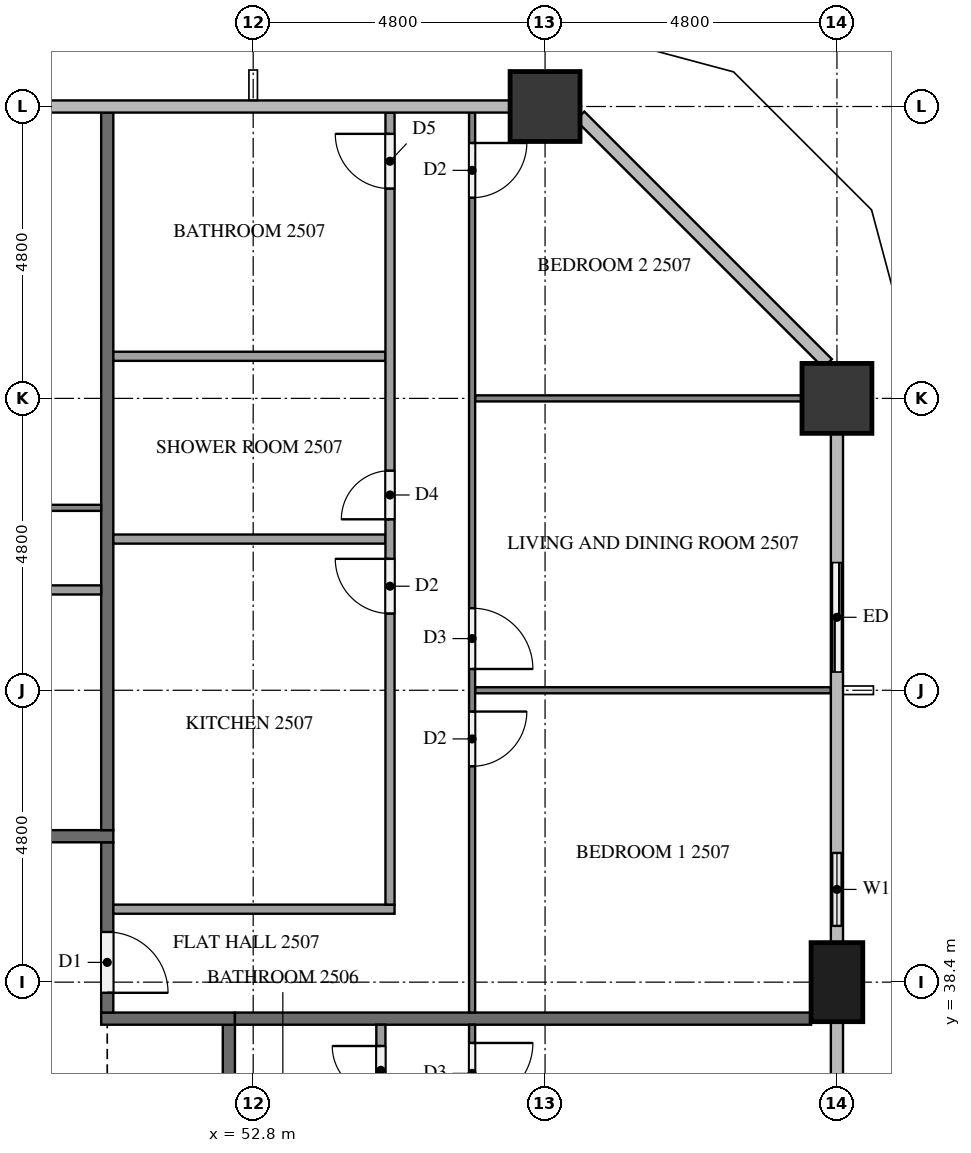
"""IFC4 building model, lengths in metres.
Left out: names, types, materials, properties, quantities, classifications, styles, units other than length and angle.
Written with IfcOpenShell. Run it as: python <this file> out.ifc"""

import sys

from ifc_helpers import new_model, si_unit, direction, frame, frame_2d, origin, origin_2d, place, context, subcontext, project, spatial, rectangle, extrude, element, fill, save


model = new_model("IFC4")
c1 = context("Model", 3, precision=1e-05, world=origin(), true_north=direction((0.0, 1.0)))
c2 = subcontext(c1, "Body", "Model", "MODEL_VIEW")
j1 = project(units=[si_unit("LENGTHUNIT", "METRE"), si_unit("PLANEANGLEUNIT", "RADIAN")], contexts=[c1])
p1 = place(None, origin())
s1 = spatial("IfcSite", under=j1, at=p1, CompositionType="ELEMENT")
p2 = place(p1, origin())
s2 = spatial("IfcBuilding", under=s1, at=p2, CompositionType="ELEMENT")
p3 = place(p2, frame((0.0, 0.0, 99.7)))
s3 = spatial("IfcBuildingStorey", under=s2, at=p3, CompositionType="ELEMENT", Elevation=99.7)
p4 = place(p3, frame((62.4, 38.4, 0.0), z_axis=(0.0, 0.0, 1.0), x_axis=(0.0, 1.0, 0.0)))
e1 = element("IfcColumn", 1, at=p4, inside=s3, PredefinedType="COLUMN", context=c2, shape_type="SweptSolid", body=[
    extrude(rectangle(XDim=1.3, YDim=0.85, at=origin_2d()), origin(), (0.0, 0.0, 1.0), 3.2),
])
for number, where, z_axis, x_axis in (
    (2, (62.4, 48.0, 0.0), (0.0, 0.0, 1.0), (1.0, 0.0, 0.0)),
    (3, (57.6, 52.8, 0.0), (0.0, 0.0, 1.0), (1.0, 0.0, 0.0)),
):
    element("IfcColumn", number, at=place(p3, frame(where, z_axis=z_axis, x_axis=x_axis)), inside=s3, PredefinedType="COLUMN", context=c2, shape_type="SweptSolid", body=[
        extrude(rectangle(XDim=1.15, YDim=1.15, at=origin_2d()), origin(), (0.0, 0.0, 1.0), 3.2),
    ])
p5 = place(p3, frame((62.4, 39.05, 0.0), z_axis=(0.0, 0.0, 1.0), x_axis=(0.0, 1.0, 0.0)))
e4 = element("IfcWall", 4, at=p5, inside=s3, PredefinedType="SOLIDWALL", context=c2, shape_type="SweptSolid", body=[
    extrude(rectangle(XDim=1.75, YDim=0.15, at=frame_2d((0.875, 0.0))), origin(), (0.0, 0.0, 1.0), 3.2),
])
p6 = place(p5, frame((0.275, 0.0, 0.9)))
e5 = element("IfcOpeningElement", 5, at=p6, cuts=e4, PredefinedType="OPENING", context=c2, shape_type="SweptSolid", body=[
    extrude(rectangle(XDim=1.2, YDim=1.4, at=frame_2d((0.6, 0.7))), frame((0.0, 0.085, 0.0), z_axis=(0.0, -1.0, 0.0), x_axis=(1.0, 0.0, 0.0)), (0.0, 0.0, 1.0), 0.17),
])
p7 = place(p3, frame((62.4, 43.2, 0.0), z_axis=(0.0, 0.0, 1.0), x_axis=(0.0, 1.0, 0.0)))
e6 = element("IfcWall", 6, at=p7, inside=s3, PredefinedType="SOLIDWALL", context=c2, shape_type="SweptSolid", body=[
    extrude(rectangle(XDim=2.4, YDim=0.15, at=frame_2d((1.2, 0.0))), origin(), (0.0, 0.0, 1.0), 3.2),
])
p8 = place(p7, frame((0.3, 0.0, 0.0)))
e7 = element("IfcOpeningElement", 7, at=p8, cuts=e6, PredefinedType="OPENING", context=c2, shape_type="SweptSolid", body=[
    extrude(rectangle(XDim=1.8, YDim=2.4, at=frame_2d((0.9, 1.2))), frame((0.0, 0.085, 0.0), z_axis=(0.0, -1.0, 0.0), x_axis=(1.0, 0.0, 0.0)), (0.0, 0.0, 1.0), 0.17),
])
p9 = place(p3, frame((52.4, 37.7, 0.0), z_axis=(0.0, 0.0, 1.0), x_axis=(0.0, -1.0, 0.0)))
e8 = element("IfcWall", 8, at=p9, inside=s3, PredefinedType="PARTITIONING", context=c2, shape_type="SweptSolid", body=[
    extrude(rectangle(XDim=22.6, YDim=0.2, at=frame_2d((11.3, 0.0))), origin(), (0.0, 0.0, 1.0), 3.2),
])
p10 = place(p9, frame((6.925, 0.0, 0.0)))
e9 = element("IfcOpeningElement", 9, at=p10, cuts=e8, PredefinedType="OPENING", context=c2, shape_type="SweptSolid", body=[
    extrude(rectangle(XDim=1.0, YDim=2.1, at=frame_2d((0.5, 1.05))), frame((0.0, 0.11, 0.0), z_axis=(0.0, -1.0, 0.0), x_axis=(1.0, 0.0, 0.0)), (0.0, 0.0, 1.0), 0.22),
])
p11 = place(p9, frame((5.075, 0.0, 0.0)))
e10 = element("IfcOpeningElement", 10, at=p11, cuts=e8, PredefinedType="OPENING", context=c2, shape_type="SweptSolid", body=[
    extrude(rectangle(XDim=1.0, YDim=2.1, at=frame_2d((0.5, 1.05))), frame((0.0, 0.11, 0.0), z_axis=(0.0, -1.0, 0.0), x_axis=(1.0, 0.0, 0.0)), (0.0, 0.0, 1.0), 0.22),
])
p12 = place(p3, frame((52.5, 37.8, 0.0), z_axis=(0.0, 0.0, 1.0), x_axis=(-1.0, 0.0, 0.0)))
e11 = element("IfcWall", 11, at=p12, inside=s3, PredefinedType="PARTITIONING", context=c2, shape_type="SweptSolid", body=[
    extrude(rectangle(XDim=2.2, YDim=0.2, at=frame_2d((1.1, 0.0))), origin(), (0.0, 0.0, 1.0), 3.2),
])
p13 = place(p3, frame((50.4, 40.7, 0.0), z_axis=(0.0, 0.0, 1.0), x_axis=(0.0, -1.0, 0.0)))
e12 = element("IfcWall", 12, at=p13, inside=s3, PredefinedType="PARTITIONING", context=c2, shape_type="SweptSolid", body=[
    extrude(rectangle(XDim=2.8, YDim=0.2, at=frame_2d((1.4, 0.0))), origin(), (0.0, 0.0, 1.0), 3.2),
])
p14 = place(p13, frame((1.475, 0.0, 0.0)))
e13 = element("IfcOpeningElement", 13, at=p14, cuts=e12, PredefinedType="OPENING", context=c2, shape_type="SweptSolid", body=[
    extrude(rectangle(XDim=1.0, YDim=2.1, at=frame_2d((0.5, 1.05))), frame((0.0, 0.11, 0.0), z_axis=(0.0, -1.0, 0.0), x_axis=(1.0, 0.0, 0.0)), (0.0, 0.0, 1.0), 0.22),
])
p15 = place(p3, frame((11.9, 40.8, 0.0), z_axis=(0.0, 0.0, 1.0), x_axis=(1.0, 0.0, 0.0)))
e14 = element("IfcWall", 14, at=p15, inside=s3, PredefinedType="PARTITIONING", context=c2, shape_type="SweptSolid", body=[
    extrude(rectangle(XDim=38.6, YDim=0.2, at=frame_2d((19.3, 0.0))), origin(), (0.0, 0.0, 1.0), 3.2),
])
p16 = place(p15, frame((22.125, 0.0, 0.0)))
e15 = element("IfcOpeningElement", 15, at=p16, cuts=e14, PredefinedType="OPENING", context=c2, shape_type="SweptSolid", body=[
    extrude(rectangle(XDim=1.0, YDim=2.1, at=frame_2d((0.5, 1.05))), frame((0.0, 0.11, 0.0), z_axis=(0.0, -1.0, 0.0), x_axis=(1.0, 0.0, 0.0)), (0.0, 0.0, 1.0), 0.22),
])
p17 = place(p15, frame((20.275, 0.0, 0.0)))
e16 = element("IfcOpeningElement", 16, at=p17, cuts=e14, PredefinedType="OPENING", context=c2, shape_type="SweptSolid", body=[
    extrude(rectangle(XDim=1.0, YDim=2.1, at=frame_2d((0.5, 1.05))), frame((0.0, 0.11, 0.0), z_axis=(0.0, -1.0, 0.0), x_axis=(1.0, 0.0, 0.0)), (0.0, 0.0, 1.0), 0.22),
])
p18 = place(p15, frame((0.525, 0.0, 0.0)))
e17 = element("IfcOpeningElement", 17, at=p18, cuts=e14, PredefinedType="OPENING", context=c2, shape_type="SweptSolid", body=[
    extrude(rectangle(XDim=1.0, YDim=2.1, at=frame_2d((0.5, 1.05))), frame((0.0, 0.11, 0.0), z_axis=(0.0, -1.0, 0.0), x_axis=(1.0, 0.0, 0.0)), (0.0, 0.0, 1.0), 0.22),
])
p19 = place(p3, frame((52.5, 37.8, 0.0), z_axis=(0.0, 0.0, 1.0), x_axis=(1.0, 0.0, 0.0)))
e18 = element("IfcWall", 18, at=p19, inside=s3, PredefinedType="PARTITIONING", context=c2, shape_type="SweptSolid", body=[
    extrude(rectangle(XDim=9.475, YDim=0.2, at=frame_2d((4.738, 0.0))), origin(), (0.0, 0.0, 1.0), 3.2),
])
p20 = place(p3, frame((50.4, 40.9, 0.0), z_axis=(0.0, 0.0, 1.0), x_axis=(0.0, 1.0, 0.0)))
e19 = element("IfcWall", 19, at=p20, inside=s3, PredefinedType="PARTITIONING", context=c2, shape_type="SweptSolid", body=[
    extrude(rectangle(XDim=11.8, YDim=0.2, at=frame_2d((5.9, 0.0))), origin(), (0.0, 0.0, 1.0), 3.2),
])
p21 = place(p3, frame((56.4, 37.7, 0.0), z_axis=(0.0, 0.0, 1.0), x_axis=(0.0, -1.0, 0.0)))
e20 = element("IfcWall", 20, at=p21, inside=s3, PredefinedType="PARTITIONING", context=c2, shape_type="SweptSolid", body=[
    extrude(rectangle(XDim=6.4, YDim=0.1, at=frame_2d((3.2, 0.0))), origin(), (0.0, 0.0, 1.0), 3.2),
])
p22 = place(p21, frame((0.3, 0.0, 0.0)))
e21 = element("IfcOpeningElement", 21, at=p22, cuts=e20, PredefinedType="OPENING", context=c2, shape_type="SweptSolid", body=[
    extrude(rectangle(XDim=1.0, YDim=2.1, at=frame_2d((0.5, 1.05))), frame((0.0, 0.06, 0.0), z_axis=(0.0, -1.0, 0.0), x_axis=(1.0, 0.0, 0.0)), (0.0, 0.0, 1.0), 0.12),
])
p23 = place(p3, frame((54.9, 33.075, 0.0), z_axis=(0.0, 0.0, 1.0), x_axis=(0.0, 1.0, 0.0)))
e22 = element("IfcWall", 22, at=p23, inside=s3, PredefinedType="PARTITIONING", context=c2, shape_type="SweptSolid", body=[
    extrude(rectangle(XDim=4.625, YDim=0.15, at=frame_2d((2.312, 0.0))), origin(), (0.0, 0.0, 1.0), 3.2),
])
p24 = place(p23, frame((0.3, 0.0, 0.0)))
e23 = element("IfcOpeningElement", 23, at=p24, cuts=e22, PredefinedType="OPENING", context=c2, shape_type="SweptSolid", body=[
    extrude(rectangle(XDim=0.9, YDim=2.1, at=frame_2d((0.45, 1.05))), frame((0.0, 0.085, 0.0), z_axis=(0.0, -1.0, 0.0), x_axis=(1.0, 0.0, 0.0)), (0.0, 0.0, 1.0), 0.17),
])
p25 = place(p23, frame((3.475, 0.0, 0.0)))
e24 = element("IfcOpeningElement", 24, at=p25, cuts=e22, PredefinedType="OPENING", context=c2, shape_type="SweptSolid", body=[
    extrude(rectangle(XDim=0.8, YDim=2.1, at=frame_2d((0.4, 1.05))), frame((0.0, 0.085, 0.0), z_axis=(0.0, -1.0, 0.0), x_axis=(1.0, 0.0, 0.0)), (0.0, 0.0, 1.0), 0.17),
])
p26 = place(p3, frame((56.45, 43.2, 0.0), z_axis=(0.0, 0.0, 1.0), x_axis=(1.0, 0.0, 0.0)))
e25 = element("IfcWall", 25, at=p26, inside=s3, PredefinedType="PARTITIONING", context=c2, shape_type="SweptSolid", body=[
    extrude(rectangle(XDim=5.85, YDim=0.1, at=frame_2d((2.925, 0.0))), origin(), (0.0, 0.0, 1.0), 3.2),
])
p27 = place(p3, frame((56.45, 48.0, 0.0), z_axis=(0.0, 0.0, 1.0), x_axis=(1.0, 0.0, 0.0)))
e26 = element("IfcWall", 26, at=p27, inside=s3, PredefinedType="PARTITIONING", context=c2, shape_type="SweptSolid", body=[
    extrude(rectangle(XDim=5.375, YDim=0.1, at=frame_2d((2.688, 0.0))), origin(), (0.0, 0.0, 1.0), 3.2),
])
p28 = place(p3, frame((56.4, 52.7, 0.0), z_axis=(0.0, 0.0, 1.0), x_axis=(0.0, -1.0, 0.0)))
e27 = element("IfcWall", 27, at=p28, inside=s3, PredefinedType="PARTITIONING", context=c2, shape_type="SweptSolid", body=[
    extrude(rectangle(XDim=14.8, YDim=0.1, at=frame_2d((7.4, 0.0))), origin(), (0.0, 0.0, 1.0), 3.2),
])
p29 = place(p28, frame((9.85, 0.0, 0.0)))
e28 = element("IfcOpeningElement", 28, at=p29, cuts=e27, PredefinedType="OPENING", context=c2, shape_type="SweptSolid", body=[
    extrude(rectangle(XDim=0.9, YDim=2.1, at=frame_2d((0.45, 1.05))), frame((0.0, 0.06, 0.0), z_axis=(0.0, -1.0, 0.0), x_axis=(1.0, 0.0, 0.0)), (0.0, 0.0, 1.0), 0.12),
])
p30 = place(p28, frame((8.15, 0.0, 0.0)))
e29 = element("IfcOpeningElement", 29, at=p30, cuts=e27, PredefinedType="OPENING", context=c2, shape_type="SweptSolid", body=[
    extrude(rectangle(XDim=1.0, YDim=2.1, at=frame_2d((0.5, 1.05))), frame((0.0, 0.06, 0.0), z_axis=(0.0, -1.0, 0.0), x_axis=(1.0, 0.0, 0.0)), (0.0, 0.0, 1.0), 0.12),
])
p31 = place(p28, frame((0.5, 0.0, 0.0)))
e30 = element("IfcOpeningElement", 30, at=p31, cuts=e27, PredefinedType="OPENING", context=c2, shape_type="SweptSolid", body=[
    extrude(rectangle(XDim=0.9, YDim=2.1, at=frame_2d((0.45, 1.05))), frame((0.0, 0.06, 0.0), z_axis=(0.0, -1.0, 0.0), x_axis=(1.0, 0.0, 0.0)), (0.0, 0.0, 1.0), 0.12),
])
for number, where, z_axis, x_axis in (
    (31, (50.5, 45.687, 0.0), (0.0, 0.0, 1.0), (1.0, 0.0, 0.0)),
    (32, (50.5, 48.692, 0.0), (0.0, 0.0, 1.0), (1.0, 0.0, 0.0)),
):
    element("IfcWall", number, at=place(p3, frame(where, z_axis=z_axis, x_axis=x_axis)), inside=s3, PredefinedType="PARTITIONING", context=c2, shape_type="SweptSolid", body=[
        extrude(rectangle(XDim=4.475, YDim=0.15, at=frame_2d((2.238, 0.0))), origin(), (0.0, 0.0, 1.0), 3.2),
    ])
p32 = place(p3, frame((50.5, 39.6, 0.0), z_axis=(0.0, 0.0, 1.0), x_axis=(1.0, 0.0, 0.0)))
e33 = element("IfcWall", 33, at=p32, inside=s3, PredefinedType="PARTITIONING", context=c2, shape_type="SweptSolid", body=[
    extrude(rectangle(XDim=4.625, YDim=0.15, at=frame_2d((2.312, 0.0))), origin(), (0.0, 0.0, 1.0), 3.2),
])
p33 = place(p3, frame((55.05, 39.675, 0.0), z_axis=(0.0, 0.0, 1.0), x_axis=(0.0, 1.0, 0.0)))
e34 = element("IfcWall", 34, at=p33, inside=s3, PredefinedType="PARTITIONING", context=c2, shape_type="SweptSolid", body=[
    extrude(rectangle(XDim=13.025, YDim=0.15, at=frame_2d((6.512, 0.0))), origin(), (0.0, 0.0, 1.0), 3.2),
])
p34 = place(p33, frame((4.787, 0.0, 0.0)))
e35 = element("IfcOpeningElement", 35, at=p34, cuts=e34, PredefinedType="OPENING", context=c2, shape_type="SweptSolid", body=[
    extrude(rectangle(XDim=0.9, YDim=2.1, at=frame_2d((0.45, 1.05))), frame((0.0, 0.085, 0.0), z_axis=(0.0, -1.0, 0.0), x_axis=(1.0, 0.0, 0.0)), (0.0, 0.0, 1.0), 0.17),
])
p35 = place(p33, frame((6.336, 0.0, 0.0)))
e36 = element("IfcOpeningElement", 36, at=p35, cuts=e34, PredefinedType="OPENING", context=c2, shape_type="SweptSolid", body=[
    extrude(rectangle(XDim=0.8, YDim=2.1, at=frame_2d((0.4, 1.05))), frame((0.0, 0.085, 0.0), z_axis=(0.0, -1.0, 0.0), x_axis=(1.0, 0.0, 0.0)), (0.0, 0.0, 1.0), 0.17),
])
p36 = place(p33, frame((11.775, 0.0, 0.0)))
e37 = element("IfcOpeningElement", 37, at=p36, cuts=e34, PredefinedType="OPENING", context=c2, shape_type="SweptSolid", body=[
    extrude(rectangle(XDim=0.9, YDim=2.1, at=frame_2d((0.45, 1.05))), frame((0.0, 0.085, 0.0), z_axis=(0.0, -1.0, 0.0), x_axis=(1.0, 0.0, 0.0)), (0.0, 0.0, 1.0), 0.17),
])
p37 = place(p3, frame((33.7, 46.2, 0.0), z_axis=(0.0, 0.0, 1.0), x_axis=(1.0, 0.0, 0.0)))
e38 = element("IfcWall", 38, at=p37, inside=s3, PredefinedType="PARTITIONING", context=c2, shape_type="SweptSolid", body=[
    extrude(rectangle(XDim=16.6, YDim=0.1, at=frame_2d((8.3, 0.0))), origin(), (0.0, 0.0, 1.0), 3.2),
])
p38 = place(p37, frame((0.3, 0.0, 0.0)))
e39 = element("IfcOpeningElement", 39, at=p38, cuts=e38, PredefinedType="OPENING", context=c2, shape_type="SweptSolid", body=[
    extrude(rectangle(XDim=0.9, YDim=2.1, at=frame_2d((0.45, 1.05))), frame((0.0, 0.06, 0.0), z_axis=(0.0, -1.0, 0.0), x_axis=(1.0, 0.0, 0.0)), (0.0, 0.0, 1.0), 0.12),
])
p39 = place(p37, frame((10.55, 0.0, 0.0)))
e40 = element("IfcOpeningElement", 40, at=p39, cuts=e38, PredefinedType="OPENING", context=c2, shape_type="SweptSolid", body=[
    extrude(rectangle(XDim=1.0, YDim=2.1, at=frame_2d((0.5, 1.05))), frame((0.0, 0.06, 0.0), z_axis=(0.0, -1.0, 0.0), x_axis=(1.0, 0.0, 0.0)), (0.0, 0.0, 1.0), 0.12),
])
p40 = place(p37, frame((12.25, 0.0, 0.0)))
e41 = element("IfcOpeningElement", 41, at=p40, cuts=e38, PredefinedType="OPENING", context=c2, shape_type="SweptSolid", body=[
    extrude(rectangle(XDim=0.9, YDim=2.1, at=frame_2d((0.45, 1.05))), frame((0.0, 0.06, 0.0), z_axis=(0.0, -1.0, 0.0), x_axis=(1.0, 0.0, 0.0)), (0.0, 0.0, 1.0), 0.12),
])
p41 = place(p3, frame((50.3, 44.85, 0.0), z_axis=(0.0, 0.0, 1.0), x_axis=(-1.0, 0.0, 0.0)))
e42 = element("IfcWall", 42, at=p41, inside=s3, PredefinedType="PARTITIONING", context=c2, shape_type="SweptSolid", body=[
    extrude(rectangle(XDim=14.825, YDim=0.15, at=frame_2d((7.413, 0.0))), origin(), (0.0, 0.0, 1.0), 3.2),
])
p42 = place(p41, frame((13.625, 0.0, 0.0)))
e43 = element("IfcOpeningElement", 43, at=p42, cuts=e42, PredefinedType="OPENING", context=c2, shape_type="SweptSolid", body=[
    extrude(rectangle(XDim=0.9, YDim=2.1, at=frame_2d((0.45, 1.05))), frame((0.0, 0.085, 0.0), z_axis=(0.0, -1.0, 0.0), x_axis=(1.0, 0.0, 0.0)), (0.0, 0.0, 1.0), 0.17),
])
p43 = place(p41, frame((4.886, 0.0, 0.0)))
e44 = element("IfcOpeningElement", 44, at=p43, cuts=e42, PredefinedType="OPENING", context=c2, shape_type="SweptSolid", body=[
    extrude(rectangle(XDim=0.8, YDim=2.1, at=frame_2d((0.4, 1.05))), frame((0.0, 0.085, 0.0), z_axis=(0.0, -1.0, 0.0), x_axis=(1.0, 0.0, 0.0)), (0.0, 0.0, 1.0), 0.17),
])
p44 = place(p41, frame((3.336, 0.0, 0.0)))
e45 = element("IfcOpeningElement", 45, at=p44, cuts=e42, PredefinedType="OPENING", context=c2, shape_type="SweptSolid", body=[
    extrude(rectangle(XDim=0.9, YDim=2.1, at=frame_2d((0.45, 1.05))), frame((0.0, 0.085, 0.0), z_axis=(0.0, -1.0, 0.0), x_axis=(1.0, 0.0, 0.0)), (0.0, 0.0, 1.0), 0.17),
])
p45 = place(p6, origin())
e46 = element("IfcWindow", 46, at=p45, inside=s3, PartitioningType="SINGLE_PANEL", PredefinedType="WINDOW", context=c2, shape_type="SweptSolid", body=[
    extrude(rectangle(XDim=1.2, YDim=1.4, at=frame_2d((0.6, 0.7))), frame((0.0, 0.03, 0.0), z_axis=(0.0, -1.0, 0.0), x_axis=(1.0, 0.0, 0.0)), (0.0, 0.0, 1.0), 0.06),
])
fill(e5, e46)
p46 = place(p8, origin())
e47 = element("IfcDoor", 47, at=p46, inside=s3, OperationType="SLIDING_TO_LEFT", PredefinedType="DOOR", context=c2, shape_type="SweptSolid", body=[
    extrude(rectangle(XDim=1.8, YDim=2.4, at=frame_2d((0.9, 1.2))), frame((0.0, 0.025, 0.0), z_axis=(0.0, -1.0, 0.0), x_axis=(1.0, 0.0, 0.0)), (0.0, 0.0, 1.0), 0.05),
])
fill(e7, e47)
p47 = place(p14, origin())
e48 = element("IfcDoor", 48, at=p47, inside=s3, OperationType="SINGLE_SWING_RIGHT", PredefinedType="DOOR", context=c2, shape_type="SweptSolid", body=[
    extrude(rectangle(XDim=1.0, YDim=2.1, at=frame_2d((0.5, 1.05))), frame((0.0, 0.025, 0.0), z_axis=(0.0, -1.0, 0.0), x_axis=(1.0, 0.0, 0.0)), (0.0, 0.0, 1.0), 0.05),
])
fill(e13, e48)
p48 = place(p22, origin())
e49 = element("IfcDoor", 49, at=p48, inside=s3, OperationType="SINGLE_SWING_LEFT", PredefinedType="DOOR", context=c2, shape_type="SweptSolid", body=[
    extrude(rectangle(XDim=1.0, YDim=2.1, at=frame_2d((0.5, 1.05))), frame((0.0, 0.025, 0.0), z_axis=(0.0, -1.0, 0.0), x_axis=(1.0, 0.0, 0.0)), (0.0, 0.0, 1.0), 0.05),
])
fill(e21, e49)
p49 = place(p25, origin())
e50 = element("IfcDoor", 50, at=p49, inside=s3, OperationType="SINGLE_SWING_RIGHT", PredefinedType="DOOR", context=c2, shape_type="SweptSolid", body=[
    extrude(rectangle(XDim=0.8, YDim=2.1, at=frame_2d((0.4, 1.05))), frame((0.0, 0.025, 0.0), z_axis=(0.0, -1.0, 0.0), x_axis=(1.0, 0.0, 0.0)), (0.0, 0.0, 1.0), 0.05),
])
fill(e24, e50)
p50 = place(p29, origin())
e51 = element("IfcDoor", 51, at=p50, inside=s3, OperationType="SINGLE_SWING_LEFT", PredefinedType="DOOR", context=c2, shape_type="SweptSolid", body=[
    extrude(rectangle(XDim=0.9, YDim=2.1, at=frame_2d((0.45, 1.05))), frame((0.0, 0.025, 0.0), z_axis=(0.0, -1.0, 0.0), x_axis=(1.0, 0.0, 0.0)), (0.0, 0.0, 1.0), 0.05),
])
fill(e28, e51)
p51 = place(p30, origin())
e52 = element("IfcDoor", 52, at=p51, inside=s3, OperationType="SINGLE_SWING_RIGHT", PredefinedType="DOOR", context=c2, shape_type="SweptSolid", body=[
    extrude(rectangle(XDim=1.0, YDim=2.1, at=frame_2d((0.5, 1.05))), frame((0.0, 0.025, 0.0), z_axis=(0.0, -1.0, 0.0), x_axis=(1.0, 0.0, 0.0)), (0.0, 0.0, 1.0), 0.05),
])
fill(e29, e52)
p52 = place(p31, origin())
e53 = element("IfcDoor", 53, at=p52, inside=s3, OperationType="SINGLE_SWING_LEFT", PredefinedType="DOOR", context=c2, shape_type="SweptSolid", body=[
    extrude(rectangle(XDim=0.9, YDim=2.1, at=frame_2d((0.45, 1.05))), frame((0.0, 0.025, 0.0), z_axis=(0.0, -1.0, 0.0), x_axis=(1.0, 0.0, 0.0)), (0.0, 0.0, 1.0), 0.05),
])
fill(e30, e53)
p53 = place(p34, origin())
e54 = element("IfcDoor", 54, at=p53, inside=s3, OperationType="SINGLE_SWING_RIGHT", PredefinedType="DOOR", context=c2, shape_type="SweptSolid", body=[
    extrude(rectangle(XDim=0.9, YDim=2.1, at=frame_2d((0.45, 1.05))), frame((0.0, 0.025, 0.0), z_axis=(0.0, -1.0, 0.0), x_axis=(1.0, 0.0, 0.0)), (0.0, 0.0, 1.0), 0.05),
])
fill(e35, e54)
p54 = place(p35, origin())
e55 = element("IfcDoor", 55, at=p54, inside=s3, OperationType="SINGLE_SWING_LEFT", PredefinedType="DOOR", context=c2, shape_type="SweptSolid", body=[
    extrude(rectangle(XDim=0.8, YDim=2.1, at=frame_2d((0.4, 1.05))), frame((0.0, 0.025, 0.0), z_axis=(0.0, -1.0, 0.0), x_axis=(1.0, 0.0, 0.0)), (0.0, 0.0, 1.0), 0.05),
])
fill(e36, e55)
p55 = place(p36, origin())
e56 = element("IfcDoor", 56, at=p55, inside=s3, OperationType="SINGLE_SWING_RIGHT", PredefinedType="DOOR", context=c2, shape_type="SweptSolid", body=[
    extrude(rectangle(XDim=0.9, YDim=2.1, at=frame_2d((0.45, 1.05))), frame((0.0, 0.025, 0.0), z_axis=(0.0, -1.0, 0.0), x_axis=(1.0, 0.0, 0.0)), (0.0, 0.0, 1.0), 0.05),
])
fill(e37, e56)
save(model, sys.argv[1])
